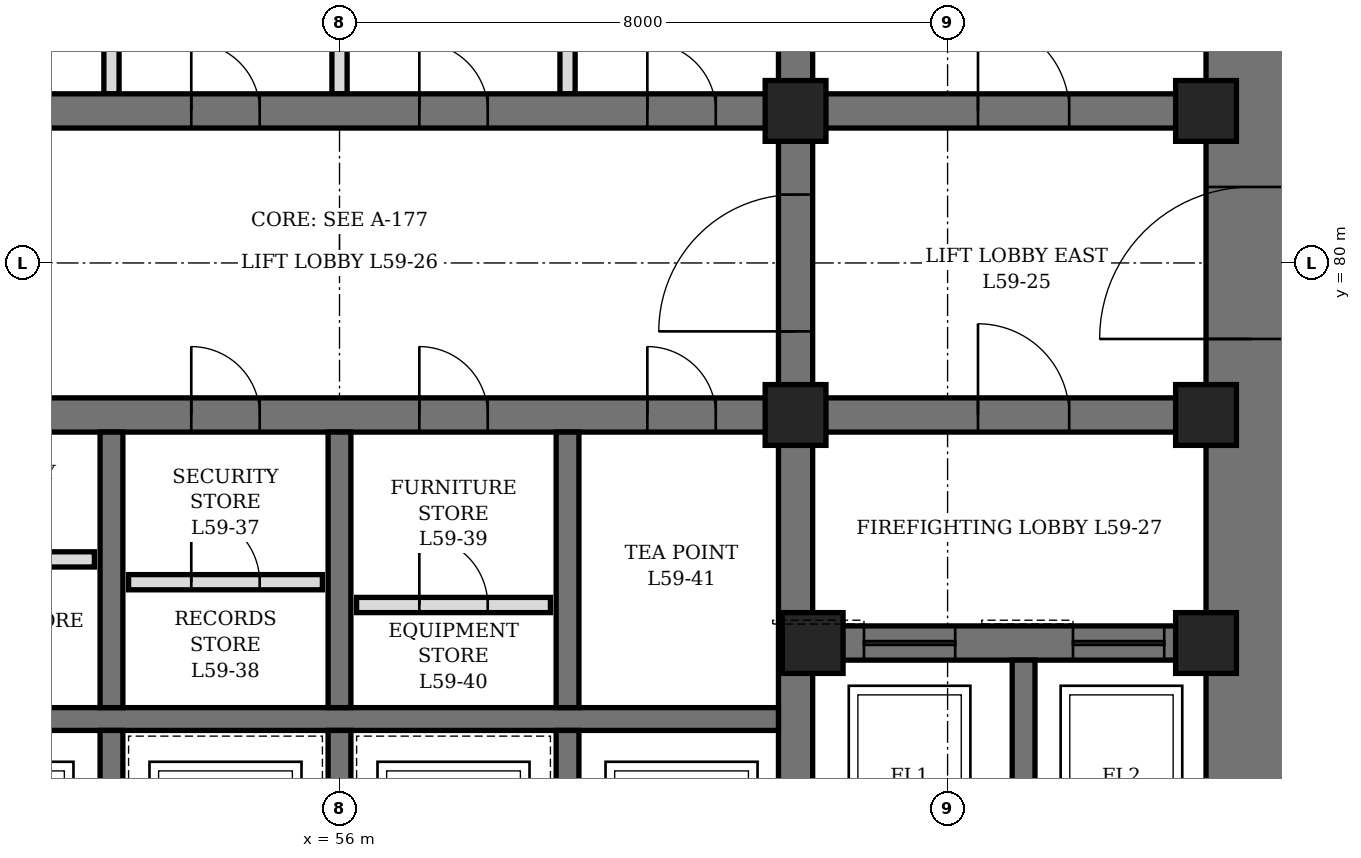
"""IFC4 building model, lengths in metres.
Left out: names, types, materials, properties, quantities, classifications, styles, units other than length and angle.
Written with IfcOpenShell. Run it as: python <this file> out.ifc"""

import sys

from ifc_helpers import new_model, si_unit, direction, frame, frame_2d, origin, origin_2d, place, context, subcontext, project, spatial, rectangle, hollow_rectangle, extrude, element, fill, save


model = new_model("IFC4")
c1 = context("Model", 3, precision=1e-05, world=origin(), true_north=direction((0.0, 1.0)))
c2 = subcontext(c1, "Body", "Model", "MODEL_VIEW")
j1 = project(units=[si_unit("LENGTHUNIT", "METRE"), si_unit("PLANEANGLEUNIT", "RADIAN")], contexts=[c1])
p1 = place(None, origin())
s1 = spatial("IfcSite", under=j1, at=p1, CompositionType="ELEMENT")
p2 = place(p1, origin())
s2 = spatial("IfcBuilding", under=s1, at=p2, CompositionType="ELEMENT")
p3 = place(p2, frame((0.0, 0.0, 262.9)))
s3 = spatial("IfcBuildingStorey", under=s2, at=p3, CompositionType="ELEMENT", Elevation=262.9)
p4 = place(p3, frame((68.0, 70.4, 0.0), z_axis=(0.0, 0.0, 1.0), x_axis=(0.0, 1.0, 0.0)))
e1 = element("IfcWall", 1, at=p4, inside=s3, PredefinedType="SHEAR", context=c2, shape_type="SweptSolid", body=[
    extrude(rectangle(XDim=19.2, YDim=1.2, at=frame_2d((9.6, 0.0))), origin(), (0.0, 0.0, 1.0), 4.2),
])
p5 = place(p4, frame((8.6, 0.0, 0.0)))
e2 = element("IfcOpeningElement", 2, at=p5, cuts=e1, PredefinedType="OPENING", context=c2, shape_type="SweptSolid", body=[
    extrude(rectangle(XDim=2.0, YDim=2.4, at=frame_2d((1.0, 1.2))), frame((0.0, 0.61, 0.0), z_axis=(0.0, -1.0, 0.0), x_axis=(1.0, 0.0, 0.0)), (0.0, 0.0, 1.0), 1.22),
])
p6 = place(p3, frame((62.0, 71.6, 0.0), z_axis=(0.0, 0.0, 1.0), x_axis=(0.0, 1.0, 0.0)))
e3 = element("IfcWall", 3, at=p6, inside=s3, PredefinedType="SHEAR", context=c2, shape_type="SweptSolid", body=[
    extrude(rectangle(XDim=16.8, YDim=0.45, at=frame_2d((8.4, 0.0))), origin(), (0.0, 0.0, 1.0), 4.2),
])
p7 = place(p6, frame((7.5, 0.0, 0.0)))
e4 = element("IfcOpeningElement", 4, at=p7, cuts=e3, PredefinedType="OPENING", context=c2, shape_type="SweptSolid", body=[
    extrude(rectangle(XDim=1.8, YDim=2.4, at=frame_2d((0.9, 1.2))), frame((0.0, 0.235, 0.0), z_axis=(0.0, -1.0, 0.0), x_axis=(1.0, 0.0, 0.0)), (0.0, 0.0, 1.0), 0.47),
])
p8 = place(p3, frame((62.225, 75.0, 0.0), z_axis=(0.0, 0.0, 1.0), x_axis=(1.0, 0.0, 0.0)))
e5 = element("IfcWall", 5, at=p8, inside=s3, PredefinedType="SHEAR", context=c2, shape_type="SweptSolid", body=[
    extrude(rectangle(XDim=5.175, YDim=0.45, at=frame_2d((2.587, 0.0))), origin(), (0.0, 0.0, 1.0), 4.2),
])
p9 = place(p8, frame((0.675, 0.0, 0.0)))
e6 = element("IfcOpeningElement", 6, at=p9, cuts=e5, PredefinedType="OPENING", context=c2, shape_type="SweptSolid", body=[
    extrude(rectangle(XDim=1.2, YDim=2.2, at=frame_2d((0.6, 1.1))), frame((0.0, 0.235, 0.0), z_axis=(0.0, -1.0, 0.0), x_axis=(1.0, 0.0, 0.0)), (0.0, 0.0, 1.0), 0.47),
])
p10 = place(p8, frame((3.425, 0.0, 0.0)))
e7 = element("IfcOpeningElement", 7, at=p10, cuts=e5, PredefinedType="OPENING", context=c2, shape_type="SweptSolid", body=[
    extrude(rectangle(XDim=1.2, YDim=2.2, at=frame_2d((0.6, 1.1))), frame((0.0, 0.235, 0.0), z_axis=(0.0, -1.0, 0.0), x_axis=(1.0, 0.0, 0.0)), (0.0, 0.0, 1.0), 0.47),
])
p11 = place(p3, frame((62.225, 78.0, 0.0), z_axis=(0.0, 0.0, 1.0), x_axis=(1.0, 0.0, 0.0)))
e8 = element("IfcWall", 8, at=p11, inside=s3, PredefinedType="SHEAR", context=c2, shape_type="SweptSolid", body=[
    extrude(rectangle(XDim=5.175, YDim=0.45, at=frame_2d((2.587, 0.0))), origin(), (0.0, 0.0, 1.0), 4.2),
])
p12 = place(p11, frame((2.175, 0.0, 0.0)))
e9 = element("IfcOpeningElement", 9, at=p12, cuts=e8, PredefinedType="OPENING", context=c2, shape_type="SweptSolid", body=[
    extrude(rectangle(XDim=1.2, YDim=2.1, at=frame_2d((0.6, 1.05))), frame((0.0, 0.235, 0.0), z_axis=(0.0, -1.0, 0.0), x_axis=(1.0, 0.0, 0.0)), (0.0, 0.0, 1.0), 0.47),
])
p13 = place(p3, frame((62.225, 82.0, 0.0), z_axis=(0.0, 0.0, 1.0), x_axis=(1.0, 0.0, 0.0)))
e10 = element("IfcWall", 10, at=p13, inside=s3, PredefinedType="SHEAR", context=c2, shape_type="SweptSolid", body=[
    extrude(rectangle(XDim=5.175, YDim=0.45, at=frame_2d((2.587, 0.0))), origin(), (0.0, 0.0, 1.0), 4.2),
])
p14 = place(p13, frame((2.175, 0.0, 0.0)))
e11 = element("IfcOpeningElement", 11, at=p14, cuts=e10, PredefinedType="OPENING", context=c2, shape_type="SweptSolid", body=[
    extrude(rectangle(XDim=1.2, YDim=2.1, at=frame_2d((0.6, 1.05))), frame((0.0, 0.235, 0.0), z_axis=(0.0, -1.0, 0.0), x_axis=(1.0, 0.0, 0.0)), (0.0, 0.0, 1.0), 0.47),
])
p15 = place(p3, frame((50.225, 78.0, 0.0), z_axis=(0.0, 0.0, 1.0), x_axis=(1.0, 0.0, 0.0)))
e12 = element("IfcWall", 12, at=p15, inside=s3, PredefinedType="SHEAR", context=c2, shape_type="SweptSolid", body=[
    extrude(rectangle(XDim=11.55, YDim=0.45, at=frame_2d((5.775, 0.0))), origin(), (0.0, 0.0, 1.0), 4.2),
])
p16 = place(p15, frame((0.825, 0.0, 0.0)))
e13 = element("IfcOpeningElement", 13, at=p16, cuts=e12, PredefinedType="OPENING", context=c2, shape_type="SweptSolid", body=[
    extrude(rectangle(XDim=0.9, YDim=2.1, at=frame_2d((0.45, 1.05))), frame((0.0, 0.235, 0.0), z_axis=(0.0, -1.0, 0.0), x_axis=(1.0, 0.0, 0.0)), (0.0, 0.0, 1.0), 0.47),
])
p17 = place(p15, frame((3.825, 0.0, 0.0)))
e14 = element("IfcOpeningElement", 14, at=p17, cuts=e12, PredefinedType="OPENING", context=c2, shape_type="SweptSolid", body=[
    extrude(rectangle(XDim=0.9, YDim=2.1, at=frame_2d((0.45, 1.05))), frame((0.0, 0.235, 0.0), z_axis=(0.0, -1.0, 0.0), x_axis=(1.0, 0.0, 0.0)), (0.0, 0.0, 1.0), 0.47),
])
p18 = place(p15, frame((6.825, 0.0, 0.0)))
e15 = element("IfcOpeningElement", 15, at=p18, cuts=e12, PredefinedType="OPENING", context=c2, shape_type="SweptSolid", body=[
    extrude(rectangle(XDim=0.9, YDim=2.1, at=frame_2d((0.45, 1.05))), frame((0.0, 0.235, 0.0), z_axis=(0.0, -1.0, 0.0), x_axis=(1.0, 0.0, 0.0)), (0.0, 0.0, 1.0), 0.47),
])
p19 = place(p15, frame((9.825, 0.0, 0.0)))
e16 = element("IfcOpeningElement", 16, at=p19, cuts=e12, PredefinedType="OPENING", context=c2, shape_type="SweptSolid", body=[
    extrude(rectangle(XDim=0.9, YDim=2.1, at=frame_2d((0.45, 1.05))), frame((0.0, 0.235, 0.0), z_axis=(0.0, -1.0, 0.0), x_axis=(1.0, 0.0, 0.0)), (0.0, 0.0, 1.0), 0.47),
])
p20 = place(p3, frame((50.225, 82.0, 0.0), z_axis=(0.0, 0.0, 1.0), x_axis=(1.0, 0.0, 0.0)))
e17 = element("IfcWall", 17, at=p20, inside=s3, PredefinedType="SHEAR", context=c2, shape_type="SweptSolid", body=[
    extrude(rectangle(XDim=11.55, YDim=0.45, at=frame_2d((5.775, 0.0))), origin(), (0.0, 0.0, 1.0), 4.2),
])
p21 = place(p20, frame((0.825, 0.0, 0.0)))
e18 = element("IfcOpeningElement", 18, at=p21, cuts=e17, PredefinedType="OPENING", context=c2, shape_type="SweptSolid", body=[
    extrude(rectangle(XDim=0.9, YDim=2.1, at=frame_2d((0.45, 1.05))), frame((0.0, 0.235, 0.0), z_axis=(0.0, -1.0, 0.0), x_axis=(1.0, 0.0, 0.0)), (0.0, 0.0, 1.0), 0.47),
])
p22 = place(p20, frame((3.825, 0.0, 0.0)))
e19 = element("IfcOpeningElement", 19, at=p22, cuts=e17, PredefinedType="OPENING", context=c2, shape_type="SweptSolid", body=[
    extrude(rectangle(XDim=0.9, YDim=2.1, at=frame_2d((0.45, 1.05))), frame((0.0, 0.235, 0.0), z_axis=(0.0, -1.0, 0.0), x_axis=(1.0, 0.0, 0.0)), (0.0, 0.0, 1.0), 0.47),
])
p23 = place(p20, frame((6.825, 0.0, 0.0)))
e20 = element("IfcOpeningElement", 20, at=p23, cuts=e17, PredefinedType="OPENING", context=c2, shape_type="SweptSolid", body=[
    extrude(rectangle(XDim=0.9, YDim=2.1, at=frame_2d((0.45, 1.05))), frame((0.0, 0.235, 0.0), z_axis=(0.0, -1.0, 0.0), x_axis=(1.0, 0.0, 0.0)), (0.0, 0.0, 1.0), 0.47),
])
p24 = place(p20, frame((9.825, 0.0, 0.0)))
e21 = element("IfcOpeningElement", 21, at=p24, cuts=e17, PredefinedType="OPENING", context=c2, shape_type="SweptSolid", body=[
    extrude(rectangle(XDim=0.9, YDim=2.1, at=frame_2d((0.45, 1.05))), frame((0.0, 0.235, 0.0), z_axis=(0.0, -1.0, 0.0), x_axis=(1.0, 0.0, 0.0)), (0.0, 0.0, 1.0), 0.47),
])
p25 = place(p3, frame((50.225, 74.0, 0.0), z_axis=(0.0, 0.0, 1.0), x_axis=(1.0, 0.0, 0.0)))
e22 = element("IfcWall", 22, at=p25, inside=s3, PredefinedType="SHEAR", context=c2, shape_type="SweptSolid", body=[
    extrude(rectangle(XDim=11.55, YDim=0.3, at=frame_2d((5.775, 0.0))), origin(), (0.0, 0.0, 1.0), 4.2),
])
p26 = place(p3, frame((53.0, 71.6, 0.0), z_axis=(0.0, 0.0, 1.0), x_axis=(0.0, 1.0, 0.0)))
e23 = element("IfcWall", 23, at=p26, inside=s3, PredefinedType="SHEAR", context=c2, shape_type="SweptSolid", body=[
    extrude(rectangle(XDim=2.25, YDim=0.3, at=frame_2d((1.125, 0.0))), origin(), (0.0, 0.0, 1.0), 4.2),
])
p27 = place(p3, frame((53.0, 74.15, 0.0), z_axis=(0.0, 0.0, 1.0), x_axis=(0.0, 1.0, 0.0)))
e24 = element("IfcWall", 24, at=p27, inside=s3, PredefinedType="SHEAR", context=c2, shape_type="SweptSolid", body=[
    extrude(rectangle(XDim=3.625, YDim=0.3, at=frame_2d((1.812, 0.0))), origin(), (0.0, 0.0, 1.0), 4.2),
])
p28 = place(p3, frame((56.0, 71.6, 0.0), z_axis=(0.0, 0.0, 1.0), x_axis=(0.0, 1.0, 0.0)))
e25 = element("IfcWall", 25, at=p28, inside=s3, PredefinedType="SHEAR", context=c2, shape_type="SweptSolid", body=[
    extrude(rectangle(XDim=2.25, YDim=0.3, at=frame_2d((1.125, 0.0))), origin(), (0.0, 0.0, 1.0), 4.2),
])
p29 = place(p3, frame((56.0, 74.15, 0.0), z_axis=(0.0, 0.0, 1.0), x_axis=(0.0, 1.0, 0.0)))
e26 = element("IfcWall", 26, at=p29, inside=s3, PredefinedType="SHEAR", context=c2, shape_type="SweptSolid", body=[
    extrude(rectangle(XDim=3.625, YDim=0.3, at=frame_2d((1.812, 0.0))), origin(), (0.0, 0.0, 1.0), 4.2),
])
p30 = place(p3, frame((59.0, 71.6, 0.0), z_axis=(0.0, 0.0, 1.0), x_axis=(0.0, 1.0, 0.0)))
e27 = element("IfcWall", 27, at=p30, inside=s3, PredefinedType="SHEAR", context=c2, shape_type="SweptSolid", body=[
    extrude(rectangle(XDim=2.25, YDim=0.3, at=frame_2d((1.125, 0.0))), origin(), (0.0, 0.0, 1.0), 4.2),
])
p31 = place(p3, frame((59.0, 74.15, 0.0), z_axis=(0.0, 0.0, 1.0), x_axis=(0.0, 1.0, 0.0)))
e28 = element("IfcWall", 28, at=p31, inside=s3, PredefinedType="SHEAR", context=c2, shape_type="SweptSolid", body=[
    extrude(rectangle(XDim=3.625, YDim=0.3, at=frame_2d((1.812, 0.0))), origin(), (0.0, 0.0, 1.0), 4.2),
])
p32 = place(p3, frame((65.0, 71.6, 0.0), z_axis=(0.0, 0.0, 1.0), x_axis=(0.0, 1.0, 0.0)))
e29 = element("IfcWall", 29, at=p32, inside=s3, PredefinedType="SHEAR", context=c2, shape_type="SweptSolid", body=[
    extrude(rectangle(XDim=3.175, YDim=0.3, at=frame_2d((1.587, 0.0))), origin(), (0.0, 0.0, 1.0), 4.2),
])
for number, where, z_axis, x_axis in (
    (30, (62.0, 78.0, 0.0), (0.0, 0.0, 1.0), (1.0, 0.0, 0.0)),
    (31, (62.0, 82.0, 0.0), (0.0, 0.0, 1.0), (1.0, 0.0, 0.0)),
    (32, (62.225, 75.0, 0.0), (0.0, 0.0, 1.0), (1.0, 0.0, 0.0)),
    (33, (67.4, 75.0, 0.0), (0.0, 0.0, 1.0), (1.0, 0.0, 0.0)),
    (34, (67.4, 78.0, 0.0), (0.0, 0.0, 1.0), (1.0, 0.0, 0.0)),
    (35, (67.4, 82.0, 0.0), (0.0, 0.0, 1.0), (1.0, 0.0, 0.0)),
):
    element("IfcColumn", number, at=place(p3, frame(where, z_axis=z_axis, x_axis=x_axis)), inside=s3, PredefinedType="COLUMN", context=c2, shape_type="SweptSolid", body=[
        extrude(hollow_rectangle(XDim=0.8, YDim=0.8, WallThickness=0.1, at=origin_2d()), origin(), (0.0, 0.0, 1.0), 4.2),
    ])
p33 = place(p3, frame((50.225, 76.1, 0.0), z_axis=(0.0, 0.0, 1.0), x_axis=(1.0, 0.0, 0.0)))
e36 = element("IfcWall", 36, at=p33, inside=s3, PredefinedType="PARTITIONING", context=c2, shape_type="SweptSolid", body=[
    extrude(rectangle(XDim=2.55, YDim=0.2, at=frame_2d((1.275, 0.0))), origin(), (0.0, 0.0, 1.0), 4.04),
])
p34 = place(p33, frame((0.825, 0.0, 0.0)))
e37 = element("IfcOpeningElement", 37, at=p34, cuts=e36, PredefinedType="OPENING", context=c2, shape_type="SweptSolid", body=[
    extrude(rectangle(XDim=0.9, YDim=2.1, at=frame_2d((0.45, 1.05))), frame((0.0, 0.11, 0.0), z_axis=(0.0, -1.0, 0.0), x_axis=(1.0, 0.0, 0.0)), (0.0, 0.0, 1.0), 0.22),
])
p35 = place(p3, frame((53.225, 75.8, 0.0), z_axis=(0.0, 0.0, 1.0), x_axis=(1.0, 0.0, 0.0)))
e38 = element("IfcWall", 38, at=p35, inside=s3, PredefinedType="PARTITIONING", context=c2, shape_type="SweptSolid", body=[
    extrude(rectangle(XDim=2.55, YDim=0.2, at=frame_2d((1.275, 0.0))), origin(), (0.0, 0.0, 1.0), 4.04),
])
p36 = place(p35, frame((0.825, 0.0, 0.0)))
e39 = element("IfcOpeningElement", 39, at=p36, cuts=e38, PredefinedType="OPENING", context=c2, shape_type="SweptSolid", body=[
    extrude(rectangle(XDim=0.9, YDim=2.1, at=frame_2d((0.45, 1.05))), frame((0.0, 0.11, 0.0), z_axis=(0.0, -1.0, 0.0), x_axis=(1.0, 0.0, 0.0)), (0.0, 0.0, 1.0), 0.22),
])
p37 = place(p3, frame((56.225, 75.5, 0.0), z_axis=(0.0, 0.0, 1.0), x_axis=(1.0, 0.0, 0.0)))
e40 = element("IfcWall", 40, at=p37, inside=s3, PredefinedType="PARTITIONING", context=c2, shape_type="SweptSolid", body=[
    extrude(rectangle(XDim=2.55, YDim=0.2, at=frame_2d((1.275, 0.0))), origin(), (0.0, 0.0, 1.0), 4.04),
])
p38 = place(p37, frame((0.825, 0.0, 0.0)))
e41 = element("IfcOpeningElement", 41, at=p38, cuts=e40, PredefinedType="OPENING", context=c2, shape_type="SweptSolid", body=[
    extrude(rectangle(XDim=0.9, YDim=2.1, at=frame_2d((0.45, 1.05))), frame((0.0, 0.11, 0.0), z_axis=(0.0, -1.0, 0.0), x_axis=(1.0, 0.0, 0.0)), (0.0, 0.0, 1.0), 0.22),
])
p39 = place(p3, frame((53.0, 82.225, 0.0), z_axis=(0.0, 0.0, 1.0), x_axis=(0.0, 1.0, 0.0)))
e42 = element("IfcWall", 42, at=p39, inside=s3, PredefinedType="PARTITIONING", context=c2, shape_type="SweptSolid", body=[
    extrude(rectangle(XDim=3.55, YDim=0.2, at=frame_2d((1.775, 0.0))), origin(), (0.0, 0.0, 1.0), 4.04),
])
p40 = place(p3, frame((56.0, 82.225, 0.0), z_axis=(0.0, 0.0, 1.0), x_axis=(0.0, 1.0, 0.0)))
e43 = element("IfcWall", 43, at=p40, inside=s3, PredefinedType="PARTITIONING", context=c2, shape_type="SweptSolid", body=[
    extrude(rectangle(XDim=3.55, YDim=0.2, at=frame_2d((1.775, 0.0))), origin(), (0.0, 0.0, 1.0), 3.14),
])
p41 = place(p3, frame((59.0, 82.225, 0.0), z_axis=(0.0, 0.0, 1.0), x_axis=(0.0, 1.0, 0.0)))
e44 = element("IfcWall", 44, at=p41, inside=s3, PredefinedType="PARTITIONING", context=c2, shape_type="SweptSolid", body=[
    extrude(rectangle(XDim=3.55, YDim=0.2, at=frame_2d((1.775, 0.0))), origin(), (0.0, 0.0, 1.0), 4.04),
])
p42 = place(p17, origin())
e45 = element("IfcDoor", 45, at=p42, inside=s3, OperationType="SINGLE_SWING_LEFT", PredefinedType="DOOR", context=c2, shape_type="SweptSolid", body=[
    extrude(rectangle(XDim=0.9, YDim=2.1, at=frame_2d((0.45, 1.05))), frame((0.0, 0.225, 0.0), z_axis=(0.0, -1.0, 0.0), x_axis=(1.0, 0.0, 0.0)), (0.0, 0.0, 1.0), 0.449),
])
fill(e14, e45)
p43 = place(p36, origin())
e46 = element("IfcDoor", 46, at=p43, inside=s3, OperationType="SINGLE_SWING_LEFT", PredefinedType="DOOR", context=c2, shape_type="SweptSolid", body=[
    extrude(rectangle(XDim=0.9, YDim=2.1, at=frame_2d((0.45, 1.05))), frame((0.0, 0.1, 0.0), z_axis=(0.0, -1.0, 0.0), x_axis=(1.0, 0.0, 0.0)), (0.0, 0.0, 1.0), 0.199),
])
fill(e39, e46)
p44 = place(p18, origin())
e47 = element("IfcDoor", 47, at=p44, inside=s3, OperationType="SINGLE_SWING_LEFT", PredefinedType="DOOR", context=c2, shape_type="SweptSolid", body=[
    extrude(rectangle(XDim=0.9, YDim=2.1, at=frame_2d((0.45, 1.05))), frame((0.0, 0.225, 0.0), z_axis=(0.0, -1.0, 0.0), x_axis=(1.0, 0.0, 0.0)), (0.0, 0.0, 1.0), 0.449),
])
fill(e15, e47)
p45 = place(p38, origin())
e48 = element("IfcDoor", 48, at=p45, inside=s3, OperationType="SINGLE_SWING_LEFT", PredefinedType="DOOR", context=c2, shape_type="SweptSolid", body=[
    extrude(rectangle(XDim=0.9, YDim=2.1, at=frame_2d((0.45, 1.05))), frame((0.0, 0.1, 0.0), z_axis=(0.0, -1.0, 0.0), x_axis=(1.0, 0.0, 0.0)), (0.0, 0.0, 1.0), 0.199),
])
fill(e41, e48)
p46 = place(p19, origin())
e49 = element("IfcDoor", 49, at=p46, inside=s3, OperationType="SINGLE_SWING_LEFT", PredefinedType="DOOR", context=c2, shape_type="SweptSolid", body=[
    extrude(rectangle(XDim=0.9, YDim=2.1, at=frame_2d((0.45, 1.05))), frame((0.0, 0.225, 0.0), z_axis=(0.0, -1.0, 0.0), x_axis=(1.0, 0.0, 0.0)), (0.0, 0.0, 1.0), 0.449),
])
fill(e16, e49)
p47 = place(p22, origin())
e50 = element("IfcDoor", 50, at=p47, inside=s3, OperationType="SINGLE_SWING_LEFT", PredefinedType="DOOR", context=c2, shape_type="SweptSolid", body=[
    extrude(rectangle(XDim=0.9, YDim=2.1, at=frame_2d((0.45, 1.05))), frame((0.0, 0.225, 0.0), z_axis=(0.0, -1.0, 0.0), x_axis=(1.0, 0.0, 0.0)), (0.0, 0.0, 1.0), 0.449),
])
fill(e19, e50)
p48 = place(p23, origin())
e51 = element("IfcDoor", 51, at=p48, inside=s3, OperationType="SINGLE_SWING_LEFT", PredefinedType="DOOR", context=c2, shape_type="SweptSolid", body=[
    extrude(rectangle(XDim=0.9, YDim=2.1, at=frame_2d((0.45, 1.05))), frame((0.0, 0.225, 0.0), z_axis=(0.0, -1.0, 0.0), x_axis=(1.0, 0.0, 0.0)), (0.0, 0.0, 1.0), 0.449),
])
fill(e20, e51)
p49 = place(p24, origin())
e52 = element("IfcDoor", 52, at=p49, inside=s3, OperationType="SINGLE_SWING_LEFT", PredefinedType="DOOR", context=c2, shape_type="SweptSolid", body=[
    extrude(rectangle(XDim=0.9, YDim=2.1, at=frame_2d((0.45, 1.05))), frame((0.0, 0.225, 0.0), z_axis=(0.0, -1.0, 0.0), x_axis=(1.0, 0.0, 0.0)), (0.0, 0.0, 1.0), 0.449),
])
fill(e21, e52)
p50 = place(p14, origin())
e53 = element("IfcDoor", 53, at=p50, inside=s3, OperationType="SINGLE_SWING_LEFT", PredefinedType="DOOR", context=c2, shape_type="SweptSolid", body=[
    extrude(rectangle(XDim=1.2, YDim=2.1, at=frame_2d((0.6, 1.05))), frame((0.0, 0.225, 0.0), z_axis=(0.0, -1.0, 0.0), x_axis=(1.0, 0.0, 0.0)), (0.0, 0.0, 1.0), 0.449),
])
fill(e11, e53)
p51 = place(p5, origin())
e54 = element("IfcDoor", 54, at=p51, inside=s3, OperationType="DOUBLE_DOOR_SINGLE_SWING", PredefinedType="DOOR", context=c2, shape_type="SweptSolid", body=[
    extrude(rectangle(XDim=2.0, YDim=2.4, at=frame_2d((1.0, 1.2))), frame((0.0, 0.35, 0.0), z_axis=(0.0, -1.0, 0.0), x_axis=(1.0, 0.0, 0.0)), (0.0, 0.0, 1.0), 0.7),
])
fill(e2, e54)
p52 = place(p7, origin())
e55 = element("IfcDoor", 55, at=p52, inside=s3, OperationType="DOUBLE_DOOR_SINGLE_SWING", PredefinedType="DOOR", context=c2, shape_type="SweptSolid", body=[
    extrude(rectangle(XDim=1.8, YDim=2.4, at=frame_2d((0.9, 1.2))), frame((0.0, 0.225, 0.0), z_axis=(0.0, -1.0, 0.0), x_axis=(1.0, 0.0, 0.0)), (0.0, 0.0, 1.0), 0.449),
])
fill(e4, e55)
p53 = place(p12, origin())
e56 = element("IfcDoor", 56, at=p53, inside=s3, OperationType="SINGLE_SWING_RIGHT", PredefinedType="DOOR", context=c2, shape_type="SweptSolid", body=[
    extrude(rectangle(XDim=1.2, YDim=2.1, at=frame_2d((0.6, 1.05))), frame((0.0, 0.225, 0.0), z_axis=(0.0, -1.0, 0.0), x_axis=(1.0, 0.0, 0.0)), (0.0, 0.0, 1.0), 0.449),
])
fill(e9, e56)
p54 = place(p9, origin())
e57 = element("IfcDoor", 57, at=p54, inside=s3, OperationType="SLIDING_TO_LEFT", PredefinedType="DOOR", context=c2, shape_type="SweptSolid", body=[
    extrude(rectangle(XDim=1.2, YDim=2.2, at=frame_2d((0.6, 1.1))), frame((0.0, 0.225, 0.0), z_axis=(0.0, -1.0, 0.0), x_axis=(1.0, 0.0, 0.0)), (0.0, 0.0, 1.0), 0.449),
])
fill(e6, e57)
p55 = place(p10, origin())
e58 = element("IfcDoor", 58, at=p55, inside=s3, OperationType="SLIDING_TO_LEFT", PredefinedType="DOOR", context=c2, shape_type="SweptSolid", body=[
    extrude(rectangle(XDim=1.2, YDim=2.2, at=frame_2d((0.6, 1.1))), frame((0.0, 0.225, 0.0), z_axis=(0.0, -1.0, 0.0), x_axis=(1.0, 0.0, 0.0)), (0.0, 0.0, 1.0), 0.449),
])
fill(e7, e58)
save(model, sys.argv[1])
